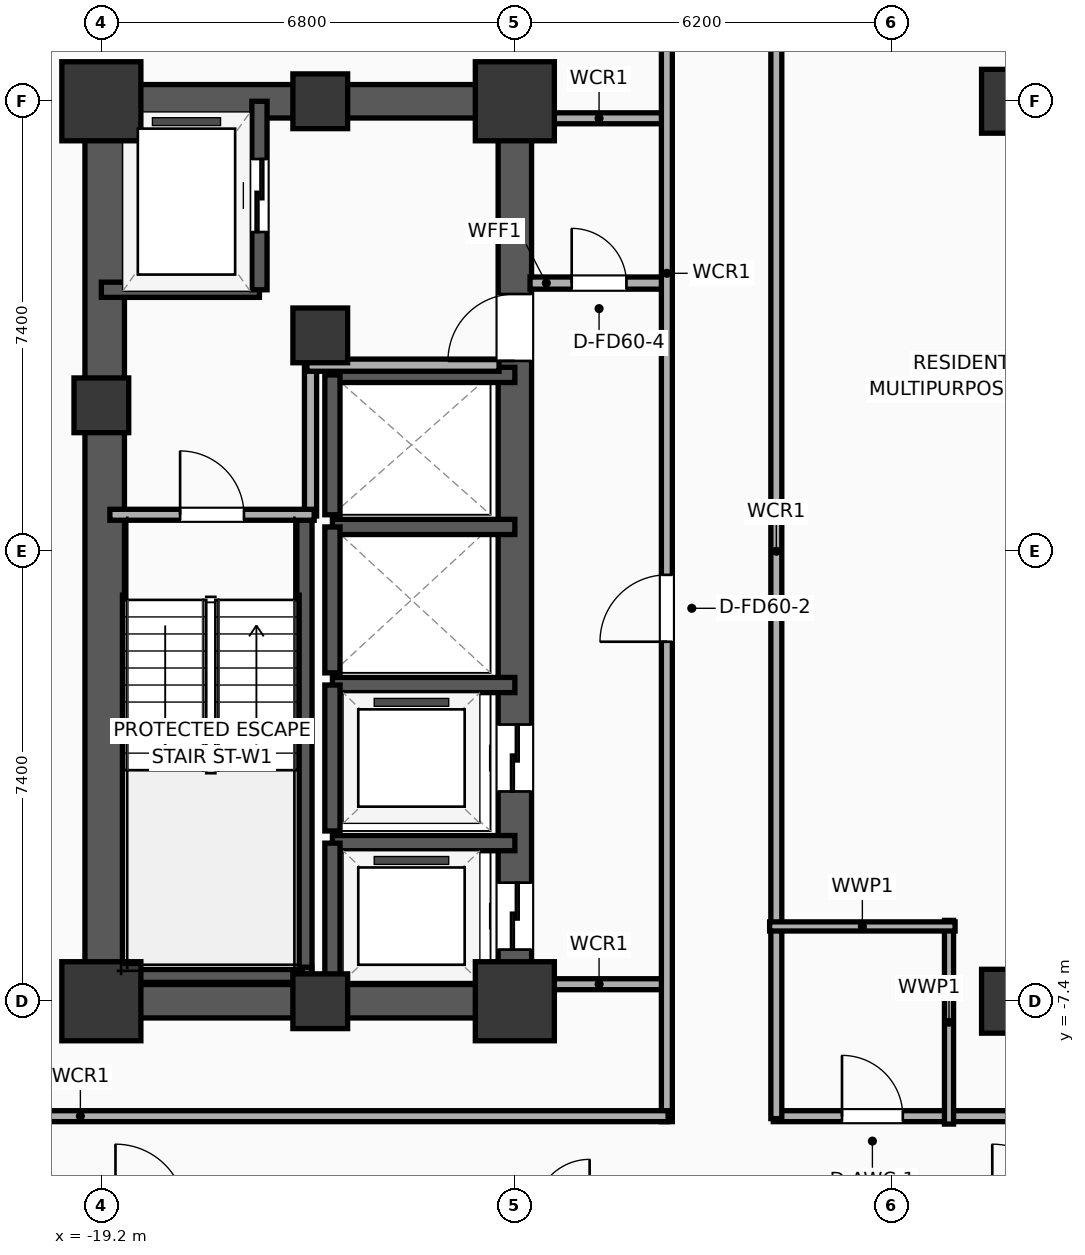
"""IFC4 building model, lengths in metres.
Left out: names, types, materials, properties, quantities, classifications, styles, units other than length and angle.
Written with IfcOpenShell. Run it as: python <this file> out.ifc"""

import sys

from ifc_helpers import new_model, si_unit, direction, frame, frame_2d, origin, origin_2d, place, context, subcontext, project, spatial, rectangle, extrude, element, fill, save


model = new_model("IFC4")
c1 = context("Model", 3, precision=1e-05, world=origin(), true_north=direction((0.0, 1.0)))
c2 = subcontext(c1, "Body", "Model", "MODEL_VIEW")
j1 = project(units=[si_unit("LENGTHUNIT", "METRE"), si_unit("PLANEANGLEUNIT", "RADIAN")], contexts=[c1])
p1 = place(None, origin())
s1 = spatial("IfcSite", under=j1, at=p1, CompositionType="ELEMENT")
p2 = place(p1, origin())
s2 = spatial("IfcBuilding", under=s1, at=p2, CompositionType="ELEMENT")
p3 = place(p2, frame((0.0, 0.0, 89.7)))
s3 = spatial("IfcBuildingStorey", under=s2, at=p3, CompositionType="ELEMENT", Elevation=89.7)
p4 = place(p3, frame((-19.2, -7.4, 0.0), z_axis=(0.0, 0.0, 1.0), x_axis=(1.0, 0.0, 0.0)))
e1 = element("IfcColumn", 1, at=p4, inside=s3, PredefinedType="COLUMN", context=c2, shape_type="SweptSolid", body=[
    extrude(rectangle(XDim=1.3, YDim=1.3, at=origin_2d()), origin(), (0.0, 0.0, 1.0), 3.9),
])
p5 = place(p3, frame((-19.2, 2.4, 0.0), z_axis=(0.0, 0.0, 1.0), x_axis=(1.0, 0.0, 0.0)))
e2 = element("IfcColumn", 2, at=p5, inside=s3, PredefinedType="COLUMN", context=c2, shape_type="SweptSolid", body=[
    extrude(rectangle(XDim=0.9, YDim=0.9, at=origin_2d()), origin(), (0.0, 0.0, 1.0), 3.9),
])
p6 = place(p3, frame((-19.2, 7.4, 0.0), z_axis=(0.0, 0.0, 1.0), x_axis=(1.0, 0.0, 0.0)))
e3 = element("IfcColumn", 3, at=p6, inside=s3, PredefinedType="COLUMN", context=c2, shape_type="SweptSolid", body=[
    extrude(rectangle(XDim=1.3, YDim=1.3, at=origin_2d()), origin(), (0.0, 0.0, 1.0), 3.9),
])
for number, where, z_axis, x_axis in (
    (4, (-15.6, -7.4, 0.0), (0.0, 0.0, 1.0), (1.0, 0.0, 0.0)),
    (5, (-15.6, 7.4, 0.0), (0.0, 0.0, 1.0), (1.0, 0.0, 0.0)),
):
    element("IfcColumn", number, at=place(p3, frame(where, z_axis=z_axis, x_axis=x_axis)), inside=s3, PredefinedType="COLUMN", context=c2, shape_type="SweptSolid", body=[
        extrude(rectangle(XDim=0.9, YDim=0.9, at=origin_2d()), origin(), (0.0, 0.0, 1.0), 3.9),
    ])
p7 = place(p3, frame((-12.4, -7.4, 0.0), z_axis=(0.0, 0.0, 1.0), x_axis=(1.0, 0.0, 0.0)))
e6 = element("IfcColumn", 6, at=p7, inside=s3, PredefinedType="COLUMN", context=c2, shape_type="SweptSolid", body=[
    extrude(rectangle(XDim=1.3, YDim=1.3, at=origin_2d()), origin(), (0.0, 0.0, 1.0), 3.9),
])
p8 = place(p3, frame((-15.6, 3.55, 0.0), z_axis=(0.0, 0.0, 1.0), x_axis=(1.0, 0.0, 0.0)))
e7 = element("IfcColumn", 7, at=p8, inside=s3, PredefinedType="COLUMN", context=c2, shape_type="SweptSolid", body=[
    extrude(rectangle(XDim=0.9, YDim=0.9, at=origin_2d()), origin(), (0.0, 0.0, 1.0), 3.9),
])
p9 = place(p3, frame((-12.4, 7.4, 0.0), z_axis=(0.0, 0.0, 1.0), x_axis=(1.0, 0.0, 0.0)))
e8 = element("IfcColumn", 8, at=p9, inside=s3, PredefinedType="COLUMN", context=c2, shape_type="SweptSolid", body=[
    extrude(rectangle(XDim=1.3, YDim=1.3, at=origin_2d()), origin(), (0.0, 0.0, 1.0), 3.9),
])
for number, where, z_axis, x_axis in (
    (9, (-19.475, -7.4, 0.0), (0.0, 0.0, 1.0), (1.0, 0.0, 0.0)),
    (10, (-19.475, 7.4, 0.0), (0.0, 0.0, 1.0), (1.0, 0.0, 0.0)),
):
    element("IfcWall", number, at=place(p3, frame(where, z_axis=z_axis, x_axis=x_axis)), inside=s3, PredefinedType="SHEAR", context=c2, shape_type="SweptSolid", body=[
        extrude(rectangle(XDim=7.35, YDim=0.55, at=frame_2d((3.675, 0.0))), origin(), (0.0, 0.0, 1.0), 3.65),
    ])
p10 = place(p3, frame((-19.145, -7.4, 0.0), z_axis=(0.0, 0.0, 1.0), x_axis=(0.0, 1.0, 0.0)))
e11 = element("IfcWall", 11, at=p10, inside=s3, PredefinedType="SHEAR", context=c2, shape_type="SweptSolid", body=[
    extrude(rectangle(XDim=14.8, YDim=0.65, at=frame_2d((7.4, 0.0))), origin(), (0.0, 0.0, 1.0), 3.65),
])
p11 = place(p3, frame((-12.4, -7.4, 0.0), z_axis=(0.0, 0.0, 1.0), x_axis=(0.0, 1.0, 0.0)))
e12 = element("IfcWall", 12, at=p11, inside=s3, PredefinedType="SHEAR", context=c2, shape_type="SweptSolid", body=[
    extrude(rectangle(XDim=14.8, YDim=0.55, at=frame_2d((7.4, 0.0))), origin(), (0.0, 0.0, 1.0), 3.65),
])
p12 = place(p11, frame((0.85, 0.0, 0.0)))
e13 = element("IfcOpeningElement", 13, at=p12, cuts=e12, PredefinedType="OPENING", context=c2, shape_type="SweptSolid", body=[
    extrude(rectangle(XDim=1.1, YDim=2.05, at=frame_2d((0.55, 1.025))), frame((0.0, 0.285, 0.0), z_axis=(0.0, -1.0, 0.0), x_axis=(1.0, 0.0, 0.0)), (0.0, 0.0, 1.0), 0.57),
])
p13 = place(p11, frame((3.45, 0.0, 0.0)))
e14 = element("IfcOpeningElement", 14, at=p13, cuts=e12, PredefinedType="OPENING", context=c2, shape_type="SweptSolid", body=[
    extrude(rectangle(XDim=1.1, YDim=2.05, at=frame_2d((0.55, 1.025))), frame((0.0, 0.285, 0.0), z_axis=(0.0, -1.0, 0.0), x_axis=(1.0, 0.0, 0.0)), (0.0, 0.0, 1.0), 0.57),
])
p14 = place(p11, frame((10.53, 0.0, 0.0)))
e15 = element("IfcOpeningElement", 15, at=p14, cuts=e12, PredefinedType="OPENING", context=c2, shape_type="SweptSolid", body=[
    extrude(rectangle(XDim=1.1, YDim=2.05, at=frame_2d((0.55, 1.025))), frame((0.0, 0.285, 0.0), z_axis=(0.0, -1.0, 0.0), x_axis=(1.0, 0.0, 0.0)), (0.0, 0.0, 1.0), 0.57),
])
p15 = place(p3, frame((-15.86, -7.085, 0.0), z_axis=(0.0, 0.0, 1.0), x_axis=(0.0, 1.0, 0.0)))
e16 = element("IfcWall", 16, at=p15, inside=s3, PredefinedType="SOLIDWALL", context=c2, shape_type="SweptSolid", body=[
    extrude(rectangle(XDim=7.685, YDim=0.25, at=frame_2d((3.843, 0.0))), origin(), (0.0, 0.0, 1.0), 3.65),
])
p16 = place(p3, frame((-19.2, -6.965, 0.0), z_axis=(0.0, 0.0, 1.0), x_axis=(1.0, 0.0, 0.0)))
e17 = element("IfcWall", 17, at=p16, inside=s3, PredefinedType="SOLIDWALL", context=c2, shape_type="SweptSolid", body=[
    extrude(rectangle(XDim=3.46, YDim=0.25, at=frame_2d((1.73, 0.0))), origin(), (0.0, 0.0, 1.0), 3.65),
])
for number, where, z_axis, x_axis in (
    (18, (-4.2, -7.4, 0.0), (0.0, 0.0, 1.0), (1.0, 0.0, 0.0)),
    (19, (-4.2, 7.4, 0.0), (0.0, 0.0, 1.0), (1.0, 0.0, 0.0)),
):
    element("IfcColumn", number, at=place(p3, frame(where, z_axis=z_axis, x_axis=x_axis)), inside=s3, PredefinedType="COLUMN", context=c2, shape_type="SweptSolid", body=[
        extrude(rectangle(XDim=1.05, YDim=1.05, at=origin_2d()), origin(), (0.0, 0.0, 1.0), 3.9),
    ])
p17 = place(p3, frame((-19.2, 4.3, 0.0), z_axis=(0.0, 0.0, 1.0), x_axis=(1.0, 0.0, 0.0)))
e20 = element("IfcWall", 20, at=p17, inside=s3, PredefinedType="SOLIDWALL", context=c2, shape_type="SweptSolid", body=[
    extrude(rectangle(XDim=2.6, YDim=0.25, at=frame_2d((1.3, 0.0))), origin(), (0.0, 0.0, 1.0), 3.65),
])
p18 = place(p3, frame((-16.6, 4.3, 0.0), z_axis=(0.0, 0.0, 1.0), x_axis=(0.0, 1.0, 0.0)))
e21 = element("IfcWall", 21, at=p18, inside=s3, PredefinedType="SOLIDWALL", context=c2, shape_type="SweptSolid", body=[
    extrude(rectangle(XDim=3.1, YDim=0.25, at=frame_2d((1.55, 0.0))), origin(), (0.0, 0.0, 1.0), 3.65),
])
p19 = place(p18, frame((0.95, 0.0, 0.0)))
e22 = element("IfcOpeningElement", 22, at=p19, cuts=e21, PredefinedType="OPENING", context=c2, shape_type="SweptSolid", body=[
    extrude(rectangle(XDim=1.2, YDim=2.05, at=frame_2d((0.6, 1.025))), frame((0.0, 0.135, 0.0), z_axis=(0.0, -1.0, 0.0), x_axis=(1.0, 0.0, 0.0)), (0.0, 0.0, 1.0), 0.27),
])
p20 = place(p3, frame((-12.4, -4.8, 0.0), z_axis=(0.0, 0.0, 1.0), x_axis=(-1.0, 0.0, 0.0)))
e23 = element("IfcWall", 23, at=p20, inside=s3, PredefinedType="SOLIDWALL", context=c2, shape_type="SweptSolid", body=[
    extrude(rectangle(XDim=3.0, YDim=0.25, at=frame_2d((1.5, 0.0))), origin(), (0.0, 0.0, 1.0), 3.65),
])
p21 = place(p3, frame((-15.4, -4.8, 0.0), z_axis=(0.0, 0.0, 1.0), x_axis=(0.0, -1.0, 0.0)))
e24 = element("IfcWall", 24, at=p21, inside=s3, PredefinedType="SOLIDWALL", context=c2, shape_type="SweptSolid", body=[
    extrude(rectangle(XDim=2.6, YDim=0.25, at=frame_2d((1.3, 0.0))), origin(), (0.0, 0.0, 1.0), 3.65),
])
p22 = place(p3, frame((-12.4, -2.2, 0.0), z_axis=(0.0, 0.0, 1.0), x_axis=(-1.0, 0.0, 0.0)))
e25 = element("IfcWall", 25, at=p22, inside=s3, PredefinedType="SOLIDWALL", context=c2, shape_type="SweptSolid", body=[
    extrude(rectangle(XDim=3.0, YDim=0.25, at=frame_2d((1.5, 0.0))), origin(), (0.0, 0.0, 1.0), 3.65),
])
p23 = place(p3, frame((-15.4, -2.2, 0.0), z_axis=(0.0, 0.0, 1.0), x_axis=(0.0, -1.0, 0.0)))
e26 = element("IfcWall", 26, at=p23, inside=s3, PredefinedType="SOLIDWALL", context=c2, shape_type="SweptSolid", body=[
    extrude(rectangle(XDim=2.4, YDim=0.25, at=frame_2d((1.2, 0.0))), origin(), (0.0, 0.0, 1.0), 3.65),
])
p24 = place(p3, frame((-12.4, 0.4, 0.0), z_axis=(0.0, 0.0, 1.0), x_axis=(-1.0, 0.0, 0.0)))
e27 = element("IfcWall", 27, at=p24, inside=s3, PredefinedType="SOLIDWALL", context=c2, shape_type="SweptSolid", body=[
    extrude(rectangle(XDim=3.0, YDim=0.25, at=frame_2d((1.5, 0.0))), origin(), (0.0, 0.0, 1.0), 3.65),
])
p25 = place(p3, frame((-15.4, 0.4, 0.0), z_axis=(0.0, 0.0, 1.0), x_axis=(0.0, -1.0, 0.0)))
e28 = element("IfcWall", 28, at=p25, inside=s3, PredefinedType="SOLIDWALL", context=c2, shape_type="SweptSolid", body=[
    extrude(rectangle(XDim=2.4, YDim=0.25, at=frame_2d((1.2, 0.0))), origin(), (0.0, 0.0, 1.0), 3.65),
])
p26 = place(p3, frame((-12.4, 2.9, 0.0), z_axis=(0.0, 0.0, 1.0), x_axis=(-1.0, 0.0, 0.0)))
e29 = element("IfcWall", 29, at=p26, inside=s3, PredefinedType="SOLIDWALL", context=c2, shape_type="SweptSolid", body=[
    extrude(rectangle(XDim=3.0, YDim=0.25, at=frame_2d((1.5, 0.0))), origin(), (0.0, 0.0, 1.0), 3.65),
])
p27 = place(p3, frame((-15.4, 2.9, 0.0), z_axis=(0.0, 0.0, 1.0), x_axis=(0.0, -1.0, 0.0)))
e30 = element("IfcWall", 30, at=p27, inside=s3, PredefinedType="SOLIDWALL", context=c2, shape_type="SweptSolid", body=[
    extrude(rectangle(XDim=2.3, YDim=0.25, at=frame_2d((1.15, 0.0))), origin(), (0.0, 0.0, 1.0), 3.65),
])
p28 = place(p3, frame((-15.76, 0.58, 0.0), z_axis=(0.0, 0.0, 1.0), x_axis=(0.0, 1.0, 0.0)))
e31 = element("IfcWall", 31, at=p28, inside=s3, PredefinedType="PARTITIONING", context=c2, shape_type="SweptSolid", body=[
    extrude(rectangle(XDim=2.52, YDim=0.2, at=frame_2d((1.26, 0.0))), origin(), (0.0, 0.0, 1.0), 3.65),
])
p29 = place(p3, frame((-15.82, 3.06, 0.0), z_axis=(0.0, 0.0, 1.0), x_axis=(1.0, 0.0, 0.0)))
e32 = element("IfcWall", 32, at=p29, inside=s3, PredefinedType="PARTITIONING", context=c2, shape_type="SweptSolid", body=[
    extrude(rectangle(XDim=3.16, YDim=0.2, at=frame_2d((1.58, 0.0))), origin(), (0.0, 0.0, 1.0), 3.65),
])
p30 = place(p3, frame((-19.06, 0.6, 0.0), z_axis=(0.0, 0.0, 1.0), x_axis=(1.0, 0.0, 0.0)))
e33 = element("IfcWall", 33, at=p30, inside=s3, PredefinedType="PARTITIONING", context=c2, shape_type="SweptSolid", body=[
    extrude(rectangle(XDim=3.36, YDim=0.18, at=frame_2d((1.68, 0.0))), origin(), (0.0, 0.0, 1.0), 3.65),
])
p31 = place(p30, frame((1.155, 0.0, 0.0)))
e34 = element("IfcOpeningElement", 34, at=p31, cuts=e33, PredefinedType="OPENING", context=c2, shape_type="SweptSolid", body=[
    extrude(rectangle(XDim=1.05, YDim=2.05, at=frame_2d((0.525, 1.025))), frame((0.0, 0.1, 0.0), z_axis=(0.0, -1.0, 0.0), x_axis=(1.0, 0.0, 0.0)), (0.0, 0.0, 1.0), 0.2),
])
p32 = place(p3, frame((-12.15, 4.41, 0.0), z_axis=(0.0, 0.0, 1.0), x_axis=(1.0, 0.0, 0.0)))
e35 = element("IfcWall", 35, at=p32, inside=s3, PredefinedType="PARTITIONING", context=c2, shape_type="SweptSolid", body=[
    extrude(rectangle(XDim=2.27, YDim=0.2, at=frame_2d((1.135, 0.0))), origin(), (0.0, 0.0, 1.0), 3.65),
])
p33 = place(p32, frame((0.685, 0.0, 0.0)))
e36 = element("IfcOpeningElement", 36, at=p33, cuts=e35, PredefinedType="OPENING", context=c2, shape_type="SweptSolid", body=[
    extrude(rectangle(XDim=0.9, YDim=2.05, at=frame_2d((0.45, 1.025))), frame((0.0, 0.11, 0.0), z_axis=(0.0, -1.0, 0.0), x_axis=(1.0, 0.0, 0.0)), (0.0, 0.0, 1.0), 0.22),
])
for number, where, z_axis, x_axis in (
    (37, (-12.15, 7.12, 0.0), (0.0, 0.0, 1.0), (1.0, 0.0, 0.0)),
    (38, (-12.15, -7.12, 0.0), (0.0, 0.0, 1.0), (1.0, 0.0, 0.0)),
):
    element("IfcWall", number, at=place(p3, frame(where, z_axis=z_axis, x_axis=x_axis)), inside=s3, PredefinedType="PARTITIONING", context=c2, shape_type="SweptSolid", body=[
        extrude(rectangle(XDim=2.27, YDim=0.18, at=frame_2d((1.135, 0.0))), origin(), (0.0, 0.0, 1.0), 3.65),
    ])
p34 = place(p3, frame((-9.9, -9.38, 0.0), z_axis=(0.0, 0.0, 1.0), x_axis=(0.0, 1.0, 0.0)))
e39 = element("IfcWall", 39, at=p34, inside=s3, PredefinedType="PARTITIONING", context=c2, shape_type="SweptSolid", body=[
    extrude(rectangle(XDim=18.76, YDim=0.18, at=frame_2d((9.38, 0.0))), origin(), (0.0, 0.0, 1.0), 3.65),
])
p35 = place(p34, frame((7.892, 0.0, 0.0)))
e40 = element("IfcOpeningElement", 40, at=p35, cuts=e39, PredefinedType="OPENING", context=c2, shape_type="SweptSolid", body=[
    extrude(rectangle(XDim=1.1, YDim=2.05, at=frame_2d((0.55, 1.025))), frame((0.0, 0.1, 0.0), z_axis=(0.0, -1.0, 0.0), x_axis=(1.0, 0.0, 0.0)), (0.0, 0.0, 1.0), 0.2),
])
p36 = place(p3, frame((-29.21, -9.29, 0.0), z_axis=(0.0, 0.0, 1.0), x_axis=(1.0, 0.0, 0.0)))
e41 = element("IfcWall", 41, at=p36, inside=s3, PredefinedType="PARTITIONING", context=c2, shape_type="SweptSolid", body=[
    extrude(rectangle(XDim=19.33, YDim=0.18, at=frame_2d((9.665, 0.0))), origin(), (0.0, 0.0, 1.0), 3.65),
])
p37 = place(p3, frame((-8.15, -9.29, 0.0), z_axis=(0.0, 0.0, 1.0), x_axis=(1.0, 0.0, 0.0)))
e42 = element("IfcWall", 42, at=p37, inside=s3, PredefinedType="PARTITIONING", context=c2, shape_type="SweptSolid", body=[
    extrude(rectangle(XDim=16.3, YDim=0.18, at=frame_2d((8.15, 0.0))), origin(), (0.0, 0.0, 1.0), 3.65),
])
p38 = place(p37, frame((1.13, 0.0, 0.0)))
e43 = element("IfcOpeningElement", 43, at=p38, cuts=e42, PredefinedType="OPENING", context=c2, shape_type="SweptSolid", body=[
    extrude(rectangle(XDim=1.0, YDim=2.05, at=frame_2d((0.5, 1.025))), frame((0.0, 0.1, 0.0), z_axis=(0.0, -1.0, 0.0), x_axis=(1.0, 0.0, 0.0)), (0.0, 0.0, 1.0), 0.2),
])
p39 = place(p37, frame((10.12, 0.0, 0.0)))
e44 = element("IfcOpeningElement", 44, at=p39, cuts=e42, PredefinedType="OPENING", context=c2, shape_type="SweptSolid", body=[
    extrude(rectangle(XDim=0.95, YDim=2.05, at=frame_2d((0.475, 1.025))), frame((0.0, 0.1, 0.0), z_axis=(0.0, -1.0, 0.0), x_axis=(1.0, 0.0, 0.0)), (0.0, 0.0, 1.0), 0.2),
])
p40 = place(p3, frame((-8.1, -9.33, 0.0), z_axis=(0.0, 0.0, 1.0), x_axis=(0.0, 1.0, 0.0)))
e45 = element("IfcWall", 45, at=p40, inside=s3, PredefinedType="PARTITIONING", context=c2, shape_type="SweptSolid", body=[
    extrude(rectangle(XDim=18.66, YDim=0.18, at=frame_2d((9.33, 0.0))), origin(), (0.0, 0.0, 1.0), 3.65),
])
p41 = place(p3, frame((-5.26, -9.42, 0.0), z_axis=(0.0, 0.0, 1.0), x_axis=(0.0, 1.0, 0.0)))
e46 = element("IfcWall", 46, at=p41, inside=s3, PredefinedType="PLUMBINGWALL", context=c2, shape_type="SweptSolid", body=[
    extrude(rectangle(XDim=3.35, YDim=0.15, at=frame_2d((1.675, 0.0))), origin(), (0.0, 0.0, 1.0), 3.65),
])
p42 = place(p3, frame((-8.21, -6.17, 0.0), z_axis=(0.0, 0.0, 1.0), x_axis=(1.0, 0.0, 0.0)))
e47 = element("IfcWall", 47, at=p42, inside=s3, PredefinedType="PLUMBINGWALL", context=c2, shape_type="SweptSolid", body=[
    extrude(rectangle(XDim=3.05, YDim=0.15, at=frame_2d((1.525, 0.0))), origin(), (0.0, 0.0, 1.0), 3.65),
])
p43 = place(p19, origin())
e48 = element("IfcDoor", 48, at=p43, inside=s3, OperationType="SLIDING_TO_LEFT", PredefinedType="DOOR", context=c2, shape_type="SweptSolid", body=[
    extrude(rectangle(XDim=1.2, YDim=2.05, at=frame_2d((0.6, 1.025))), frame((0.0, 0.025, 0.0), z_axis=(0.0, -1.0, 0.0), x_axis=(1.0, 0.0, 0.0)), (0.0, 0.0, 1.0), 0.05),
])
fill(e22, e48)
p44 = place(p12, origin())
e49 = element("IfcDoor", 49, at=p44, inside=s3, OperationType="SLIDING_TO_LEFT", PredefinedType="DOOR", context=c2, shape_type="SweptSolid", body=[
    extrude(rectangle(XDim=1.1, YDim=2.05, at=frame_2d((0.55, 1.025))), frame((0.0, 0.025, 0.0), z_axis=(0.0, -1.0, 0.0), x_axis=(1.0, 0.0, 0.0)), (0.0, 0.0, 1.0), 0.05),
])
fill(e13, e49)
p45 = place(p13, origin())
e50 = element("IfcDoor", 50, at=p45, inside=s3, OperationType="SLIDING_TO_LEFT", PredefinedType="DOOR", context=c2, shape_type="SweptSolid", body=[
    extrude(rectangle(XDim=1.1, YDim=2.05, at=frame_2d((0.55, 1.025))), frame((0.0, 0.025, 0.0), z_axis=(0.0, -1.0, 0.0), x_axis=(1.0, 0.0, 0.0)), (0.0, 0.0, 1.0), 0.05),
])
fill(e14, e50)
p46 = place(p31, origin())
e51 = element("IfcDoor", 51, at=p46, inside=s3, OperationType="SINGLE_SWING_LEFT", PredefinedType="DOOR", context=c2, shape_type="SweptSolid", body=[
    extrude(rectangle(XDim=1.05, YDim=2.05, at=frame_2d((0.525, 1.025))), frame((0.0, 0.025, 0.0), z_axis=(0.0, -1.0, 0.0), x_axis=(1.0, 0.0, 0.0)), (0.0, 0.0, 1.0), 0.05),
])
fill(e34, e51)
p47 = place(p33, origin())
e52 = element("IfcDoor", 52, at=p47, inside=s3, OperationType="SINGLE_SWING_LEFT", PredefinedType="DOOR", context=c2, shape_type="SweptSolid", body=[
    extrude(rectangle(XDim=0.9, YDim=2.05, at=frame_2d((0.45, 1.025))), frame((0.0, 0.025, 0.0), z_axis=(0.0, -1.0, 0.0), x_axis=(1.0, 0.0, 0.0)), (0.0, 0.0, 1.0), 0.05),
])
fill(e36, e52)
p48 = place(p35, origin())
e53 = element("IfcDoor", 53, at=p48, inside=s3, OperationType="SINGLE_SWING_LEFT", PredefinedType="DOOR", context=c2, shape_type="SweptSolid", body=[
    extrude(rectangle(XDim=1.1, YDim=2.05, at=frame_2d((0.55, 1.025))), frame((0.0, 0.025, 0.0), z_axis=(0.0, -1.0, 0.0), x_axis=(1.0, 0.0, 0.0)), (0.0, 0.0, 1.0), 0.05),
])
fill(e40, e53)
p49 = place(p38, origin())
e54 = element("IfcDoor", 54, at=p49, inside=s3, OperationType="SINGLE_SWING_LEFT", PredefinedType="DOOR", context=c2, shape_type="SweptSolid", body=[
    extrude(rectangle(XDim=1.0, YDim=2.05, at=frame_2d((0.5, 1.025))), frame((0.0, 0.025, 0.0), z_axis=(0.0, -1.0, 0.0), x_axis=(1.0, 0.0, 0.0)), (0.0, 0.0, 1.0), 0.05),
])
fill(e43, e54)
p50 = place(p14, origin())
e55 = element("IfcDoor", 55, at=p50, inside=s3, OperationType="SINGLE_SWING_LEFT", PredefinedType="DOOR", context=c2, shape_type="SweptSolid", body=[
    extrude(rectangle(XDim=1.1, YDim=2.05, at=frame_2d((0.55, 1.025))), frame((0.0, 0.025, 0.0), z_axis=(0.0, -1.0, 0.0), x_axis=(1.0, 0.0, 0.0)), (0.0, 0.0, 1.0), 0.05),
])
fill(e15, e55)
save(model, sys.argv[1])
